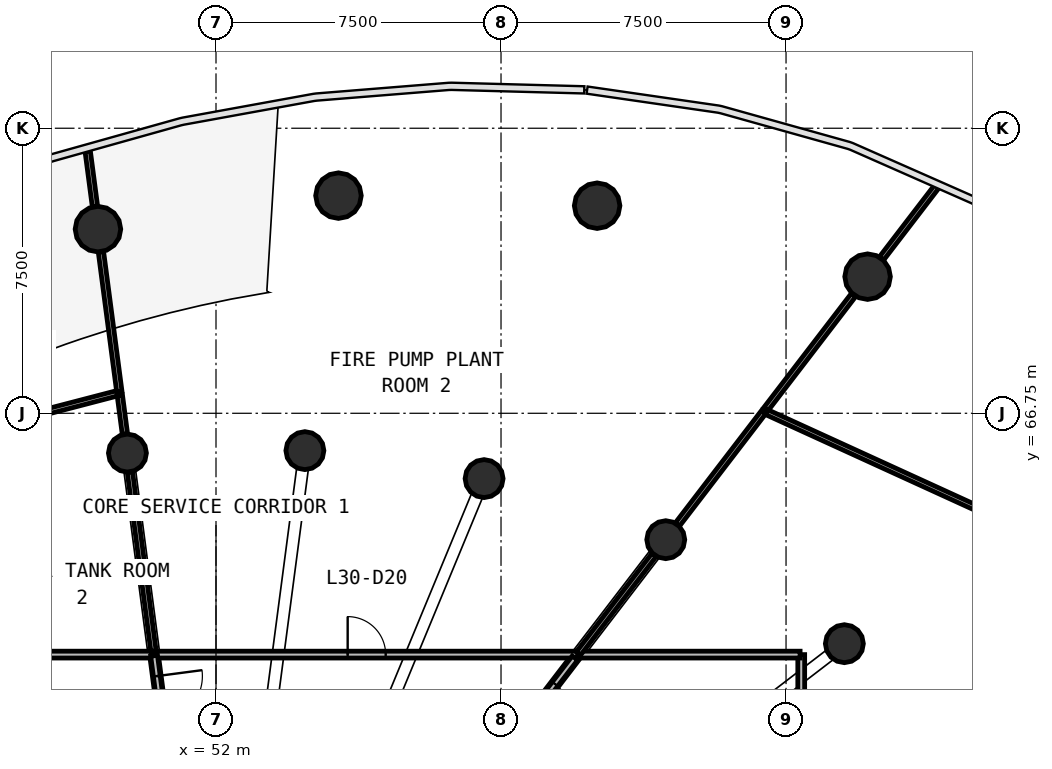
"""IFC4 building model, lengths in metres.
Left out: names, types, materials, properties, quantities, classifications, styles, units other than length and angle.
Written with IfcOpenShell. Run it as: python <this file> out.ifc"""

import sys

from ifc_helpers import new_model, si_unit, direction, frame, frame_2d, origin, origin_2d, place, context, subcontext, project, spatial, rectangle, circle, extrude, source, transform, mapped, element, fill, save


model = new_model("IFC4")
c1 = context("Model", 3, precision=1e-05, world=origin(), true_north=direction((0.0, 1.0)))
c2 = subcontext(c1, "Body", "Model", "MODEL_VIEW")
j1 = project(units=[si_unit("LENGTHUNIT", "METRE"), si_unit("PLANEANGLEUNIT", "RADIAN")], contexts=[c1])
p1 = place(None, origin())
s1 = spatial("IfcSite", under=j1, at=p1, CompositionType="ELEMENT")
p2 = place(p1, origin())
s2 = spatial("IfcBuilding", under=s1, at=p2, CompositionType="ELEMENT")
p3 = place(p2, frame((0.0, 0.0, 129.0)))
s3 = spatial("IfcBuildingStorey", under=s2, at=p3, CompositionType="ELEMENT", Elevation=129.0)
m1 = source(origin(), c2, "Body", "SweptSolid", [
    extrude(circle(Radius=0.6, at=origin_2d()), origin(), (0.0, 0.0, 1.0), 3.78),
])
for number, where, z_axis, x_axis in (
    (1, (69.146, 70.345, 0.0), (0.0, 0.0, 1.0), (1.0, 0.0, 0.0)),
    (2, (62.029, 72.212, 0.0), (0.0, 0.0, 1.0), (1.0, 0.0, 0.0)),
    (3, (55.222, 72.477, 0.0), (0.0, 0.0, 1.0), (1.0, 0.0, 0.0)),
    (4, (48.894, 71.595, 0.0), (0.0, 0.0, 1.0), (1.0, 0.0, 0.0)),
):
    element("IfcColumn", number, at=place(p3, frame(where, z_axis=z_axis, x_axis=x_axis)), inside=s3, PredefinedType="COLUMN", context=c2, shape_type="MappedRepresentation", body=[
        mapped(m1, transform((0.0, 0.0, 0.0), scale=1.0)),
    ])
m2 = source(origin(), c2, "Body", "SweptSolid", [
    extrude(circle(Radius=0.5, at=origin_2d()), origin(), (0.0, 0.0, 1.0), 3.78),
])
for number, where, z_axis, x_axis in (
    (5, (68.535, 60.688, 0.0), (0.0, 0.0, 1.0), (1.0, 0.0, 0.0)),
    (6, (63.835, 63.424, 0.0), (0.0, 0.0, 1.0), (1.0, 0.0, 0.0)),
    (7, (59.055, 65.031, 0.0), (0.0, 0.0, 1.0), (1.0, 0.0, 0.0)),
    (8, (54.339, 65.767, 0.0), (0.0, 0.0, 1.0), (1.0, 0.0, 0.0)),
    (9, (49.669, 65.703, 0.0), (0.0, 0.0, 1.0), (1.0, 0.0, 0.0)),
):
    element("IfcColumn", number, at=place(p3, frame(where, z_axis=z_axis, x_axis=x_axis)), inside=s3, PredefinedType="COLUMN", context=c2, shape_type="MappedRepresentation", body=[
        mapped(m2, transform((0.0, 0.0, 0.0), scale=1.0)),
    ])
p4 = place(p3, frame((36.6, 60.4, 0.0), z_axis=(0.0, 0.0, 1.0), x_axis=(1.0, 0.0, 0.0)))
e10 = element("IfcWall", 10, at=p4, inside=s3, PredefinedType="PARTITIONING", context=c2, shape_type="SweptSolid", body=[
    extrude(rectangle(XDim=13.767, YDim=0.18, at=frame_2d((6.884, 0.0))), origin(), (0.0, 0.0, 1.0), 2.58),
])
p5 = place(p4, frame((6.317, 0.0, 0.0)))
e11 = element("IfcOpeningElement", 11, at=p5, cuts=e10, PredefinedType="OPENING", context=c2, shape_type="SweptSolid", body=[
    extrude(rectangle(XDim=1.0, YDim=2.1, at=frame_2d((0.5, 1.05))), frame((0.0, 0.1, 0.0), z_axis=(0.0, -1.0, 0.0), x_axis=(1.0, 0.0, 0.0)), (0.0, 0.0, 1.0), 0.2),
])
p6 = place(p3, frame((50.397, 60.4, 0.0), z_axis=(0.0, 0.0, 1.0), x_axis=(1.0, 0.0, 0.0)))
e12 = element("IfcWall", 12, at=p6, inside=s3, PredefinedType="PARTITIONING", context=c2, shape_type="SweptSolid", body=[
    extrude(rectangle(XDim=11.117, YDim=0.18, at=frame_2d((5.559, 0.0))), origin(), (0.0, 0.0, 1.0), 2.58),
])
p7 = place(p6, frame((5.067, 0.0, 0.0)))
e13 = element("IfcOpeningElement", 13, at=p7, cuts=e12, PredefinedType="OPENING", context=c2, shape_type="SweptSolid", body=[
    extrude(rectangle(XDim=1.0, YDim=2.1, at=frame_2d((0.5, 1.05))), frame((0.0, 0.1, 0.0), z_axis=(0.0, -1.0, 0.0), x_axis=(1.0, 0.0, 0.0)), (0.0, 0.0, 1.0), 0.2),
])
p8 = place(p3, frame((67.4, 60.4, 0.0), z_axis=(0.0, 0.0, 1.0), x_axis=(0.0, -1.0, 0.0)))
e14 = element("IfcWall", 14, at=p8, inside=s3, PredefinedType="PARTITIONING", context=c2, shape_type="SweptSolid", body=[
    extrude(rectangle(XDim=10.343, YDim=0.18, at=frame_2d((5.171, 0.0))), origin(), (0.0, 0.0, 1.0), 2.58),
])
p9 = place(p8, frame((4.693, 0.0, 0.0)))
e15 = element("IfcOpeningElement", 15, at=p9, cuts=e14, PredefinedType="OPENING", context=c2, shape_type="SweptSolid", body=[
    extrude(rectangle(XDim=1.0, YDim=2.1, at=frame_2d((0.5, 1.05))), frame((0.0, 0.1, 0.0), z_axis=(0.0, -1.0, 0.0), x_axis=(1.0, 0.0, 0.0)), (0.0, 0.0, 1.0), 0.2),
])
p10 = place(p3, frame((67.37, 60.4, 0.0), z_axis=(0.0, 0.0, 1.0), x_axis=(-1.0, 0.0, 0.0)))
e16 = element("IfcWall", 16, at=p10, inside=s3, PredefinedType="PARTITIONING", context=c2, shape_type="SweptSolid", body=[
    extrude(rectangle(XDim=5.825, YDim=0.18, at=frame_2d((2.913, 0.0))), origin(), (0.0, 0.0, 1.0), 2.58),
])
p11 = place(p3, frame((61.446, 60.31, 0.0), z_axis=(0.0, 0.0, 1.0), x_axis=(-0.608737787706, -0.793371480341, 0.0)))
e17 = element("IfcWall", 17, at=p11, inside=s3, PredefinedType="PARTITIONING", context=c2, shape_type="SweptSolid", body=[
    extrude(rectangle(XDim=2.912, YDim=0.18, at=frame_2d((1.456, 0.0))), origin(), (0.0, 0.0, 1.0), 2.58),
])
p12 = place(p11, frame((0.862, 0.0, 0.0)))
e18 = element("IfcOpeningElement", 18, at=p12, cuts=e17, PredefinedType="OPENING", context=c2, shape_type="SweptSolid", body=[
    extrude(rectangle(XDim=1.2, YDim=2.1, at=frame_2d((0.6, 1.05))), frame((0.0, 0.1, 0.0), z_axis=(0.0, -1.0, 0.0), x_axis=(1.0, 0.0, 0.0)), (0.0, 0.0, 1.0), 0.2),
])
p13 = place(p3, frame((50.371, 60.37, 0.0), z_axis=(0.0, 0.0, 1.0), x_axis=(0.13060507681, -0.991434472828, 0.0)))
e19 = element("IfcWall", 19, at=p13, inside=s3, PredefinedType="PARTITIONING", context=c2, shape_type="SweptSolid", body=[
    extrude(rectangle(XDim=2.391, YDim=0.18, at=frame_2d((1.195, 0.0))), origin(), (0.0, 0.0, 1.0), 2.58),
])
p14 = place(p13, frame((0.541, 0.0, 0.0)))
e20 = element("IfcOpeningElement", 20, at=p14, cuts=e19, PredefinedType="OPENING", context=c2, shape_type="SweptSolid", body=[
    extrude(rectangle(XDim=1.2, YDim=2.1, at=frame_2d((0.6, 1.05))), frame((0.0, 0.1, 0.0), z_axis=(0.0, -1.0, 0.0), x_axis=(1.0, 0.0, 0.0)), (0.0, 0.0, 1.0), 0.2),
])
p15 = place(p3, frame((72.748, 63.92, 0.0), z_axis=(0.0, 0.0, 1.0), x_axis=(-0.909542442832, 0.415611049765, 0.0)))
e21 = element("IfcWall", 21, at=p15, inside=s3, PredefinedType="PARTITIONING", context=c2, shape_type="SweptSolid", body=[
    extrude(rectangle(XDim=6.945, YDim=0.14, at=frame_2d((3.473, 0.0))), origin(), (0.0, 0.0, 1.0), 2.58),
])
p16 = place(p3, frame((44.569, 66.017, 0.0), z_axis=(0.0, 0.0, 1.0), x_axis=(0.967691095233, 0.252138739998, 0.0)))
e22 = element("IfcWall", 22, at=p16, inside=s3, PredefinedType="PARTITIONING", context=c2, shape_type="SweptSolid", body=[
    extrude(rectangle(XDim=5.054, YDim=0.14, at=frame_2d((2.527, 0.0))), origin(), (0.0, 0.0, 1.0), 2.58),
])
p17 = place(p16, frame((2.004, 0.0, 0.0)))
e23 = element("IfcOpeningElement", 23, at=p17, cuts=e22, PredefinedType="OPENING", context=c2, shape_type="SweptSolid", body=[
    extrude(rectangle(XDim=1.0, YDim=2.1, at=frame_2d((0.5, 1.05))), frame((0.0, 0.08, 0.0), z_axis=(0.0, -1.0, 0.0), x_axis=(1.0, 0.0, 0.0)), (0.0, 0.0, 1.0), 0.16),
])
p18 = place(p3, frame((50.356, 60.49, 0.0), z_axis=(0.0, 0.0, 1.0), x_axis=(-0.130548834981, 0.991441880135, 0.0)))
e24 = element("IfcWall", 24, at=p18, inside=s3, PredefinedType="PARTITIONING", context=c2, shape_type="SweptSolid", body=[
    extrude(rectangle(XDim=4.754, YDim=0.14, at=frame_2d((2.377, 0.0))), origin(), (0.0, 0.0, 1.0), 2.58),
])
p19 = place(p3, frame((66.475, 66.864, 0.0), z_axis=(0.0, 0.0, 1.0), x_axis=(0.608749841057, 0.793362231905, 0.0)))
e25 = element("IfcWall", 25, at=p19, inside=s3, PredefinedType="PARTITIONING", context=c2, shape_type="SweptSolid", body=[
    extrude(rectangle(XDim=3.783, YDim=0.14, at=frame_2d((1.892, 0.0))), origin(), (0.0, 0.0, 1.0), 2.58),
])
p20 = place(p3, frame((64.142, 63.824, 0.0), z_axis=(0.0, 0.0, 1.0), x_axis=(0.608761301523, 0.793353438114, 0.0)))
e26 = element("IfcWall", 26, at=p20, inside=s3, PredefinedType="PARTITIONING", context=c2, shape_type="SweptSolid", body=[
    extrude(rectangle(XDim=3.73, YDim=0.14, at=frame_2d((1.865, 0.0))), origin(), (0.0, 0.0, 1.0), 2.58),
])
p21 = place(p3, frame((49.456, 67.322, 0.0), z_axis=(0.0, 0.0, 1.0), x_axis=(-0.130558454313, 0.991440613455, 0.0)))
e27 = element("IfcWall", 27, at=p21, inside=s3, PredefinedType="PARTITIONING", context=c2, shape_type="SweptSolid", body=[
    extrude(rectangle(XDim=3.706, YDim=0.14, at=frame_2d((1.853, 0.0))), origin(), (0.0, 0.0, 1.0), 2.58),
])
p22 = place(p3, frame((61.537, 60.429, 0.0), z_axis=(0.0, 0.0, 1.0), x_axis=(0.608754323654, 0.793358792371, 0.0)))
e28 = element("IfcWall", 28, at=p22, inside=s3, PredefinedType="PARTITIONING", context=c2, shape_type="SweptSolid", body=[
    extrude(rectangle(XDim=3.271, YDim=0.14, at=frame_2d((1.635, 0.0))), origin(), (0.0, 0.0, 1.0), 2.58),
])
p23 = place(p3, frame((69.514, 70.824, 0.0), z_axis=(0.0, 0.0, 1.0), x_axis=(0.608723111947, 0.793382740537, 0.0)))
e29 = element("IfcWall", 29, at=p23, inside=s3, PredefinedType="PARTITIONING", context=c2, shape_type="SweptSolid", body=[
    extrude(rectangle(XDim=2.39, YDim=0.14, at=frame_2d((1.195, 0.0))), origin(), (0.0, 0.0, 1.0), 2.98),
])
p24 = place(p3, frame((48.815, 72.195, 0.0), z_axis=(0.0, 0.0, 1.0), x_axis=(-0.13042446584, 0.991458248597, 0.0)))
e30 = element("IfcWall", 30, at=p24, inside=s3, PredefinedType="PARTITIONING", context=c2, shape_type="SweptSolid", body=[
    extrude(rectangle(XDim=1.471, YDim=0.14, at=frame_2d((0.736, 0.0))), origin(), (0.0, 0.0, 1.0), 2.98),
])
p25 = place(p3, frame((49.604, 66.203, 0.0), z_axis=(0.0, 0.0, 1.0), x_axis=(-0.130497554193, 0.991448631221, 0.0)))
e31 = element("IfcWall", 31, at=p25, inside=s3, PredefinedType="PARTITIONING", context=c2, shape_type="SweptSolid", body=[
    extrude(rectangle(XDim=1.027, YDim=0.14, at=frame_2d((0.514, 0.0))), origin(), (0.0, 0.0, 1.0), 2.58),
])
m3 = source(origin(), c2, "Body", "SweptSolid", [
    extrude(rectangle(XDim=1.0, YDim=2.1, at=frame_2d((0.5, 1.05))), frame((0.0, 0.025, 0.0), z_axis=(0.0, -1.0, 0.0), x_axis=(1.0, 0.0, 0.0)), (0.0, 0.0, 1.0), 0.05),
])
p26 = place(p7, origin())
e32 = element("IfcDoor", 32, at=p26, inside=s3, OperationType="SINGLE_SWING_LEFT", PredefinedType="DOOR", context=c2, shape_type="MappedRepresentation", body=[
    mapped(m3, transform((0.0, 0.0, 0.0), scale=1.0)),
])
fill(e13, e32)
m4 = source(origin(), c2, "Body", "SweptSolid", [
    extrude(rectangle(XDim=1.2, YDim=2.1, at=frame_2d((0.6, 1.05))), frame((0.0, 0.025, 0.0), z_axis=(0.0, -1.0, 0.0), x_axis=(1.0, 0.0, 0.0)), (0.0, 0.0, 1.0), 0.05),
])
p27 = place(p12, origin())
e33 = element("IfcDoor", 33, at=p27, inside=s3, OperationType="SINGLE_SWING_RIGHT", PredefinedType="DOOR", context=c2, shape_type="MappedRepresentation", body=[
    mapped(m4, transform((0.0, 0.0, 0.0), scale=1.0)),
])
fill(e18, e33)
p28 = place(p14, origin())
e34 = element("IfcDoor", 34, at=p28, inside=s3, OperationType="SINGLE_SWING_LEFT", PredefinedType="DOOR", context=c2, shape_type="MappedRepresentation", body=[
    mapped(m4, transform((0.0, 0.0, 0.0), scale=1.0)),
])
fill(e20, e34)
save(model, sys.argv[1])
